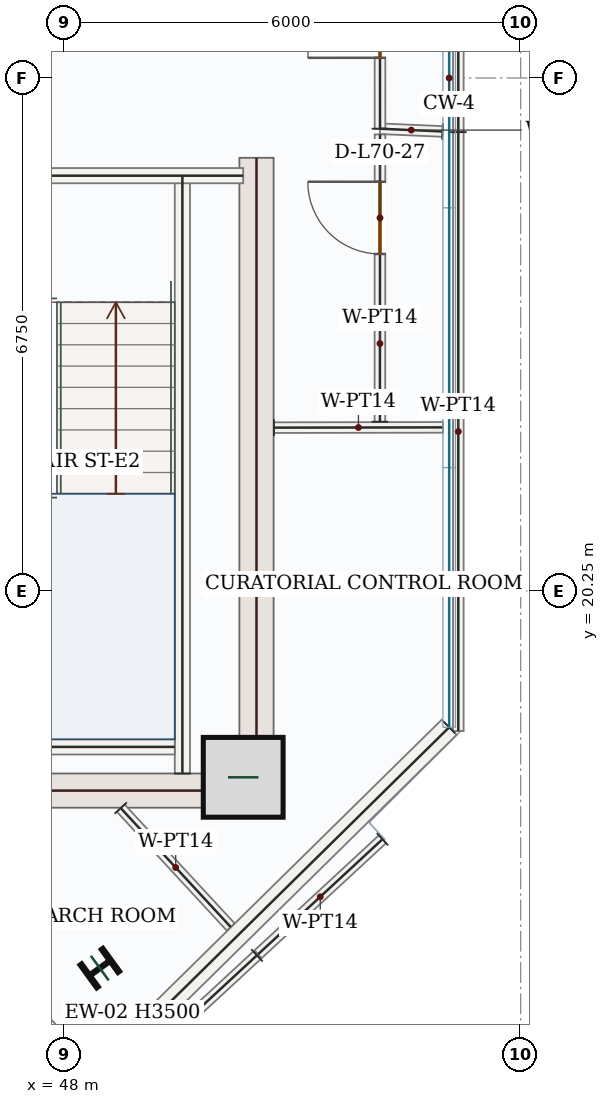
"""IFC4 building model, lengths in metres.
Left out: names, types, materials, properties, quantities, classifications, styles, units other than length and angle.
Written with IfcOpenShell. Run it as: python <this file> out.ifc"""

import sys

from ifc_helpers import new_model, si_unit, direction, frame, frame_2d, origin, origin_2d, place, context, subcontext, project, spatial, rectangle, i_section, extrude, source, transform, mapped, element, fill, save


model = new_model("IFC4")
c1 = context("Model", 3, precision=1e-05, world=origin(), true_north=direction((0.0, 1.0)))
c2 = subcontext(c1, "Body", "Model", "MODEL_VIEW")
j1 = project(units=[si_unit("LENGTHUNIT", "METRE"), si_unit("PLANEANGLEUNIT", "RADIAN")], contexts=[c1])
p1 = place(None, origin())
s1 = spatial("IfcSite", under=j1, at=p1, CompositionType="ELEMENT")
p2 = place(p1, origin())
s2 = spatial("IfcBuilding", under=s1, at=p2, CompositionType="ELEMENT")
p3 = place(p2, frame((0.0, 0.0, 291.6)))
s3 = spatial("IfcBuildingStorey", under=s2, at=p3, CompositionType="ELEMENT", Elevation=291.6)
m1 = source(origin(), c2, "Body", "SweptSolid", [
    extrude(rectangle(XDim=8.55, YDim=0.45, at=frame_2d((4.275, 0.0))), origin(), (0.0, 0.0, 1.0), 3.5),
])
p4 = place(p3, frame((50.525, 17.4, 0.0), z_axis=(0.0, 0.0, 1.0), x_axis=(0.0, 1.0, 0.0)))
e1 = element("IfcWall", 1, at=p4, inside=s3, PredefinedType="SHEAR", context=c2, shape_type="MappedRepresentation", body=[
    mapped(m1, transform((0.0, 0.0, 0.0), x_axis=(1.0, 0.0, 0.0), y_axis=(0.0, 1.0, 0.0), z_axis=(0.0, 0.0, 1.0), scale=1.0)),
])
m2 = source(origin(), c2, "Body", "SweptSolid", [
    extrude(rectangle(XDim=7.1, YDim=0.45, at=frame_2d((3.55, 0.0))), origin(), (0.0, 0.0, 1.0), 3.5),
])
p5 = place(p3, frame((43.2, 17.625, 0.0), z_axis=(0.0, 0.0, 1.0), x_axis=(1.0, 0.0, 0.0)))
e2 = element("IfcWall", 2, at=p5, inside=s3, PredefinedType="SHEAR", context=c2, shape_type="MappedRepresentation", body=[
    mapped(m2, transform((0.0, 0.0, 0.0), x_axis=(1.0, 0.0, 0.0), y_axis=(0.0, 1.0, 0.0), z_axis=(0.0, 0.0, 1.0), scale=1.0)),
])
m3 = source(origin(), c2, "Body", "SweptSolid", [
    extrude(rectangle(XDim=1.05, YDim=1.05, at=origin_2d()), origin(), (0.0, 0.0, 1.0), 3.75),
])
p6 = place(p3, frame((50.35, 17.8, 0.0), z_axis=(0.0, 0.0, 1.0), x_axis=(1.0, 0.0, 0.0)))
e3 = element("IfcColumn", 3, at=p6, inside=s3, PredefinedType="COLUMN", context=c2, shape_type="MappedRepresentation", body=[
    mapped(m3, transform((0.0, 0.0, 0.0), x_axis=(1.0, 0.0, 0.0), y_axis=(0.0, 1.0, 0.0), z_axis=(0.0, 0.0, 1.0), scale=1.0)),
])
m4 = source(origin(), c2, "Body", "SweptSolid", [
    extrude(i_section(OverallWidth=0.374, OverallDepth=0.372, WebThickness=0.016, FlangeThickness=0.026, FilletRadius=0.018, at=origin_2d()), origin(), (0.0, 0.0, 1.0), 3.75),
])
p7 = place(p3, frame((48.464, 15.289, 0.0), z_axis=(0.0, 0.0, 1.0), x_axis=(-0.587785252292, 0.809016994375, 0.0)))
e4 = element("IfcColumn", 4, at=p7, inside=s3, PredefinedType="COLUMN", context=c2, shape_type="MappedRepresentation", body=[
    mapped(m4, transform((0.0, 0.0, 0.0), x_axis=(1.0, 0.0, 0.0), y_axis=(0.0, 1.0, 0.0), z_axis=(0.0, 0.0, 1.0), scale=1.0)),
])
m5 = source(origin(), c2, "Body", "SweptSolid", [
    extrude(rectangle(XDim=11.69, YDim=0.28, at=frame_2d((5.845, 0.0))), origin(), (0.0, 0.0, 1.0), 3.5),
])
p8 = place(p3, frame((53.06, 18.458, 0.0), z_axis=(0.0, 0.0, 1.0), x_axis=(-0.712557502542, -0.701613715353, 0.0)))
e5 = element("IfcWall", 5, at=p8, inside=s3, PredefinedType="SOLIDWALL", context=c2, shape_type="MappedRepresentation", body=[
    mapped(m5, transform((0.0, 0.0, 0.0), x_axis=(1.0, 0.0, 0.0), y_axis=(0.0, 1.0, 0.0), z_axis=(0.0, 0.0, 1.0), scale=1.0)),
])
m6 = source(origin(), c2, "Body", "SweptSolid", [
    extrude(rectangle(XDim=7.87, YDim=0.2, at=frame_2d((3.935, 0.0))), origin(), (0.0, 0.0, 1.0), 3.5),
])
p9 = place(p3, frame((49.55, 17.85, 0.0), z_axis=(0.0, 0.0, 1.0), x_axis=(0.0, 1.0, 0.0)))
e6 = element("IfcWall", 6, at=p9, inside=s3, PredefinedType="SOLIDWALL", context=c2, shape_type="MappedRepresentation", body=[
    mapped(m6, transform((0.0, 0.0, 0.0), x_axis=(1.0, 0.0, 0.0), y_axis=(0.0, 1.0, 0.0), z_axis=(0.0, 0.0, 1.0), scale=1.0)),
])
m7 = source(origin(), c2, "Body", "SweptSolid", [
    extrude(rectangle(XDim=4.25, YDim=0.2, at=frame_2d((2.125, 0.0))), origin(), (0.0, 0.0, 1.0), 3.5),
])
p10 = place(p3, frame((46.1, 25.715, 0.0), z_axis=(0.0, 0.0, 1.0), x_axis=(1.0, 0.0, 0.0)))
e7 = element("IfcWall", 7, at=p10, inside=s3, PredefinedType="SOLIDWALL", context=c2, shape_type="MappedRepresentation", body=[
    mapped(m7, transform((0.0, 0.0, 0.0), x_axis=(1.0, 0.0, 0.0), y_axis=(0.0, 1.0, 0.0), z_axis=(0.0, 0.0, 1.0), scale=1.0)),
])
m8 = source(origin(), c2, "Body", "SweptSolid", [
    extrude(rectangle(XDim=3.25, YDim=0.2, at=frame_2d((1.625, 0.0))), origin(), (0.0, 0.0, 1.0), 3.5),
])
p11 = place(p3, frame((46.2, 18.2, 0.0), z_axis=(0.0, 0.0, 1.0), x_axis=(1.0, 0.0, 0.0)))
e8 = element("IfcWall", 8, at=p11, inside=s3, PredefinedType="SOLIDWALL", context=c2, shape_type="MappedRepresentation", body=[
    mapped(m8, transform((0.0, 0.0, 0.0), x_axis=(1.0, 0.0, 0.0), y_axis=(0.0, 1.0, 0.0), z_axis=(0.0, 0.0, 1.0), scale=1.0)),
])
p12 = place(p3, frame((48.311, 13.985, 0.0), z_axis=(0.0, 0.0, 1.0), x_axis=(-0.679002327249, 0.73413611789, 0.0)))
e9 = element("IfcWall", 9, at=p12, inside=s3, PredefinedType="PARTITIONING", context=c2, shape_type="SweptSolid", body=[
    extrude(rectangle(XDim=4.645, YDim=0.14, at=frame_2d((2.323, 0.0))), origin(), (0.0, 0.0, 1.0), 3.5),
])
p13 = place(p12, frame((2.882, 0.0, 0.0)))
e10 = element("IfcOpeningElement", 10, at=p13, cuts=e9, PredefinedType="OPENING", context=c2, shape_type="SweptSolid", body=[
    extrude(rectangle(XDim=0.95, YDim=2.15, at=frame_2d((0.475, 1.075))), frame((0.0, 0.08, 0.0), z_axis=(0.0, -1.0, 0.0), x_axis=(1.0, 0.0, 0.0)), (0.0, 0.0, 1.0), 0.16),
])
m9 = source(origin(), c2, "Body", "SweptSolid", [
    extrude(rectangle(XDim=2.13, YDim=0.14, at=frame_2d((1.065, 0.0))), origin(), (0.0, 0.0, 1.0), 3.5),
])
p14 = place(p3, frame((48.739, 17.395, 0.0), z_axis=(0.0, 0.0, 1.0), x_axis=(0.678946242809, -0.734187986401, 0.0)))
e11 = element("IfcWall", 11, at=p14, inside=s3, PredefinedType="PARTITIONING", context=c2, shape_type="MappedRepresentation", body=[
    mapped(m9, transform((0.0, 0.0, 0.0), x_axis=(1.0, 0.0, 0.0), y_axis=(0.0, 1.0, 0.0), z_axis=(0.0, 0.0, 1.0), scale=1.0)),
])
m10 = source(origin(), c2, "Body", "SweptSolid", [
    extrude(rectangle(XDim=2.63, YDim=0.14, at=frame_2d((1.315, 0.0))), origin(), (0.0, 0.0, 1.0), 3.5),
])
p15 = place(p3, frame((50.531, 15.458, 0.0), z_axis=(0.0, 0.0, 1.0), x_axis=(-0.73409481217, -0.679046984196, 0.0)))
e12 = element("IfcWall", 12, at=p15, inside=s3, PredefinedType="PARTITIONING", context=c2, shape_type="MappedRepresentation", body=[
    mapped(m10, transform((0.0, 0.0, 0.0), x_axis=(1.0, 0.0, 0.0), y_axis=(0.0, 1.0, 0.0), z_axis=(0.0, 0.0, 1.0), scale=1.0)),
])
m11 = source(origin(), c2, "Body", "SweptSolid", [
    extrude(rectangle(XDim=9.304, YDim=0.14, at=frame_2d((4.652, 0.0))), origin(), (0.0, 0.0, 1.0), 3.5),
])
p16 = place(p3, frame((53.18, 35.592, 0.0), z_axis=(0.0, 0.0, 1.0), x_axis=(0.0, -1.0, 0.0)))
e13 = element("IfcWall", 13, at=p16, inside=s3, PredefinedType="PARTITIONING", context=c2, shape_type="MappedRepresentation", body=[
    mapped(m11, transform((0.0, 0.0, 0.0), x_axis=(1.0, 0.0, 0.0), y_axis=(0.0, 1.0, 0.0), z_axis=(0.0, 0.0, 1.0), scale=1.0)),
])
m12 = source(origin(), c2, "Body", "SweptSolid", [
    extrude(rectangle(XDim=0.823, YDim=0.14, at=frame_2d((0.412, 0.0))), origin(), (0.0, 0.0, 1.0), 3.5),
])
p17 = place(p3, frame((52.972, 26.297, 0.0), z_axis=(0.0, 0.0, 1.0), x_axis=(-0.999049432265, 0.043591649315, 0.0)))
e14 = element("IfcWall", 14, at=p17, inside=s3, PredefinedType="PARTITIONING", context=c2, shape_type="MappedRepresentation", body=[
    mapped(m12, transform((0.0, 0.0, 0.0), x_axis=(1.0, 0.0, 0.0), y_axis=(0.0, 1.0, 0.0), z_axis=(0.0, 0.0, 1.0), scale=1.0)),
])
p18 = place(p3, frame((52.15, 26.333, 0.0), z_axis=(0.0, 0.0, 1.0), x_axis=(-0.000188111359, 0.999999982307, 0.0)))
e15 = element("IfcWall", 15, at=p18, inside=s3, PredefinedType="PARTITIONING", context=c2, shape_type="SweptSolid", body=[
    extrude(rectangle(XDim=5.191, YDim=0.14, at=frame_2d((2.596, 0.0))), origin(), (0.0, 0.0, 1.0), 3.5),
])
p19 = place(p18, frame((0.933, 0.0, 0.0)))
e16 = element("IfcOpeningElement", 16, at=p19, cuts=e15, PredefinedType="OPENING", context=c2, shape_type="SweptSolid", body=[
    extrude(rectangle(XDim=0.95, YDim=2.15, at=frame_2d((0.475, 1.075))), frame((0.0, 0.08, 0.0), z_axis=(0.0, -1.0, 0.0), x_axis=(1.0, 0.0, 0.0)), (0.0, 0.0, 1.0), 0.16),
])
m13 = source(origin(), c2, "Body", "SweptSolid", [
    extrude(rectangle(XDim=2.223, YDim=0.14, at=frame_2d((1.111, 0.0))), origin(), (0.0, 0.0, 1.0), 3.5),
])
p20 = place(p3, frame((50.755, 22.4, 0.0), z_axis=(0.0, 0.0, 1.0), x_axis=(0.99999881761, 0.00153778377, 0.0)))
e17 = element("IfcWall", 17, at=p20, inside=s3, PredefinedType="PARTITIONING", context=c2, shape_type="MappedRepresentation", body=[
    mapped(m13, transform((0.0, 0.0, 0.0), x_axis=(1.0, 0.0, 0.0), y_axis=(0.0, 1.0, 0.0), z_axis=(0.0, 0.0, 1.0), scale=1.0)),
])
p21 = place(p3, frame((52.149, 22.477, 0.0), z_axis=(0.0, 0.0, 1.0), x_axis=(0.000322913959, 0.999999947863, 0.0)))
e18 = element("IfcWall", 18, at=p21, inside=s3, PredefinedType="PARTITIONING", context=c2, shape_type="SweptSolid", body=[
    extrude(rectangle(XDim=3.78, YDim=0.14, at=frame_2d((1.89, 0.0))), origin(), (0.0, 0.0, 1.0), 3.5),
])
p22 = place(p21, frame((2.208, 0.0, 0.0)))
e19 = element("IfcOpeningElement", 19, at=p22, cuts=e18, PredefinedType="OPENING", context=c2, shape_type="SweptSolid", body=[
    extrude(rectangle(XDim=0.95, YDim=2.15, at=frame_2d((0.475, 1.075))), frame((0.0, 0.08, 0.0), z_axis=(0.0, -1.0, 0.0), x_axis=(1.0, 0.0, 0.0)), (0.0, 0.0, 1.0), 0.16),
])
m14 = source(origin(), c2, "Body", "SweptSolid", [
    extrude(rectangle(XDim=7.879, YDim=0.14, at=frame_2d((3.94, 0.0))), origin(), (0.0, 0.0, 1.0), 3.5),
])
p23 = place(p3, frame((53.18, 26.288, 0.0), z_axis=(0.0, 0.0, 1.0), x_axis=(0.0, -1.0, 0.0)))
e20 = element("IfcWall", 20, at=p23, inside=s3, PredefinedType="PARTITIONING", context=c2, shape_type="MappedRepresentation", body=[
    mapped(m14, transform((0.0, 0.0, 0.0), x_axis=(1.0, 0.0, 0.0), y_axis=(0.0, 1.0, 0.0), z_axis=(0.0, 0.0, 1.0), scale=1.0)),
])
m15 = source(origin(), c2, "Body", "SweptSolid", [
    extrude(rectangle(XDim=2.229, YDim=0.14, at=frame_2d((1.115, 0.0))), origin(), (0.0, 0.0, 1.0), 3.5),
])
p24 = place(p3, frame((52.182, 16.985, 0.0), z_axis=(0.0, 0.0, 1.0), x_axis=(-0.734110356631, -0.679030179217, 0.0)))
e21 = element("IfcWall", 21, at=p24, inside=s3, PredefinedType="PARTITIONING", context=c2, shape_type="MappedRepresentation", body=[
    mapped(m15, transform((0.0, 0.0, 0.0), x_axis=(1.0, 0.0, 0.0), y_axis=(0.0, 1.0, 0.0), z_axis=(0.0, 0.0, 1.0), scale=1.0)),
])
m16 = source(origin(), c2, "Body", "SweptSolid", [
    extrude(rectangle(XDim=0.95, YDim=2.15, at=frame_2d((0.475, 1.075))), frame((0.0, 0.025, 0.0), z_axis=(0.0, -1.0, 0.0), x_axis=(1.0, 0.0, 0.0)), (0.0, 0.0, 1.0), 0.05),
])
p25 = place(p19, origin())
e22 = element("IfcDoor", 22, at=p25, inside=s3, OperationType="SINGLE_SWING_LEFT", PredefinedType="DOOR", context=c2, shape_type="MappedRepresentation", body=[
    mapped(m16, transform((0.0, 0.0, 0.0), x_axis=(1.0, 0.0, 0.0), y_axis=(0.0, 1.0, 0.0), z_axis=(0.0, 0.0, 1.0), scale=1.0)),
])
fill(e16, e22)
p26 = place(p22, origin())
e23 = element("IfcDoor", 23, at=p26, inside=s3, OperationType="SINGLE_SWING_RIGHT", PredefinedType="DOOR", context=c2, shape_type="MappedRepresentation", body=[
    mapped(m16, transform((0.0, 0.0, 0.0), x_axis=(1.0, 0.0, 0.0), y_axis=(0.0, 1.0, 0.0), z_axis=(0.0, 0.0, 1.0), scale=1.0)),
])
fill(e19, e23)
save(model, sys.argv[1])
